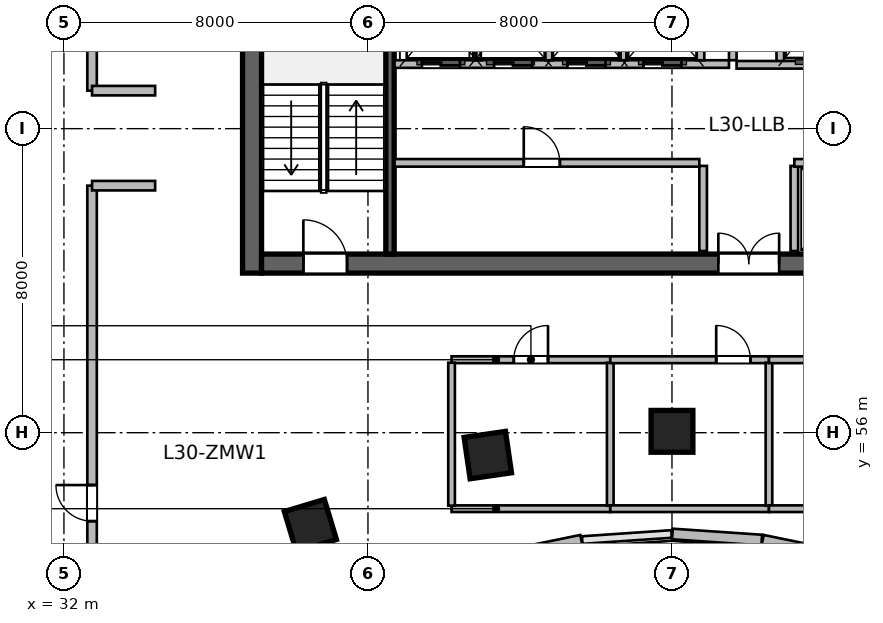
"""IFC4 building model, lengths in metres.
Left out: names, types, materials, properties, quantities, classifications, styles, units other than length and angle.
Written with IfcOpenShell. Run it as: python <this file> out.ifc"""

import sys

from ifc_helpers import new_model, si_unit, direction, frame, frame_2d, origin, origin_2d, place, context, subcontext, project, spatial, rectangle, extrude, source, transform, mapped, element, fill, save


model = new_model("IFC4")
c1 = context("Model", 3, precision=1e-05, world=origin(), true_north=direction((0.0, 1.0)))
c2 = subcontext(c1, "Body", "Model", "MODEL_VIEW")
j1 = project(units=[si_unit("LENGTHUNIT", "METRE"), si_unit("PLANEANGLEUNIT", "RADIAN")], contexts=[c1])
p1 = place(None, origin())
s1 = spatial("IfcSite", under=j1, at=p1, CompositionType="ELEMENT")
p2 = place(p1, origin())
s2 = spatial("IfcBuilding", under=s1, at=p2, CompositionType="ELEMENT")
p3 = place(p2, frame((0.0, 0.0, 127.2)))
s3 = spatial("IfcBuildingStorey", under=s2, at=p3, CompositionType="ELEMENT", Elevation=127.2)
m1 = source(origin(), c2, "Body", "SweptSolid", [
    extrude(rectangle(XDim=12.0, YDim=0.5, at=frame_2d((6.0, 0.0))), origin(), (0.0, 0.0, 1.0), 3.9),
])
p4 = place(p3, frame((36.95, 60.2, 0.0), z_axis=(0.0, 0.0, 1.0), x_axis=(0.0, 1.0, 0.0)))
e1 = element("IfcWall", 1, at=p4, inside=s3, PredefinedType="SHEAR", context=c2, shape_type="MappedRepresentation", body=[
    mapped(m1, transform((0.0, 0.0, 0.0), scale=1.0)),
])
m2 = source(origin(), c2, "Body", "SweptSolid", [
    extrude(rectangle(XDim=21.6, YDim=0.5, at=frame_2d((10.8, 0.0))), origin(), (0.0, 0.0, 1.0), 3.9),
])
p5 = place(p3, frame((37.2, 60.45, 0.0), z_axis=(0.0, 0.0, 1.0), x_axis=(1.0, 0.0, 0.0)))
e2 = element("IfcWall", 2, at=p5, inside=s3, PredefinedType="SHEAR", context=c2, shape_type="MappedRepresentation", body=[
    mapped(m2, transform((0.0, 0.0, 0.0), scale=1.0)),
])
p6 = place(p5, frame((1.1, 0.0, 0.0)))
e3 = element("IfcOpeningElement", 3, at=p6, cuts=e2, PredefinedType="OPENING", context=c2, shape_type="SweptSolid", body=[
    extrude(rectangle(XDim=1.15, YDim=2.15, at=frame_2d((0.575, 1.075))), frame((0.0, 0.26, 0.0), z_axis=(0.0, -1.0, 0.0), x_axis=(1.0, 0.0, 0.0)), (0.0, 0.0, 1.0), 0.52),
])
p7 = place(p5, frame((19.5, 0.0, 0.0)))
e4 = element("IfcOpeningElement", 4, at=p7, cuts=e2, PredefinedType="OPENING", context=c2, shape_type="SweptSolid", body=[
    extrude(rectangle(XDim=0.9, YDim=2.1, at=frame_2d((0.45, 1.05))), frame((0.0, 0.26, 0.0), z_axis=(0.0, -1.0, 0.0), x_axis=(1.0, 0.0, 0.0)), (0.0, 0.0, 1.0), 0.52),
])
p8 = place(p5, frame((12.02, 0.0, 0.0)))
e5 = element("IfcOpeningElement", 5, at=p8, cuts=e2, PredefinedType="OPENING", context=c2, shape_type="SweptSolid", body=[
    extrude(rectangle(XDim=1.6, YDim=2.15, at=frame_2d((0.8, 1.075))), frame((0.0, 0.26, 0.0), z_axis=(0.0, -1.0, 0.0), x_axis=(1.0, 0.0, 0.0)), (0.0, 0.0, 1.0), 0.52),
])
m3 = source(origin(), c2, "Body", "SweptSolid", [
    extrude(rectangle(XDim=11.0, YDim=0.22, at=frame_2d((5.5, 0.0))), origin(), (0.0, 0.0, 1.0), 3.9),
])
p9 = place(p3, frame((40.58, 60.7, 0.0), z_axis=(0.0, 0.0, 1.0), x_axis=(0.0, 1.0, 0.0)))
e6 = element("IfcWall", 6, at=p9, inside=s3, PredefinedType="SHEAR", context=c2, shape_type="MappedRepresentation", body=[
    mapped(m3, transform((0.0, 0.0, 0.0), scale=1.0)),
])
m4 = source(origin(), c2, "Body", "SweptSolid", [
    extrude(rectangle(XDim=1.1, YDim=1.1, at=origin_2d()), origin(), (0.0, 0.0, 1.0), 3.9),
])
for number, where, z_axis, x_axis in (
    (7, (38.485, 53.558, 0.0), (0.0, 0.0, 1.0), (-0.289, 0.957, 0.0)),
    (8, (43.154, 55.411, 0.0), (0.0, 0.0, 1.0), (-0.143, 0.99, 0.0)),
    (9, (48.0, 56.036, 0.0), (0.0, 0.0, 1.0), (0.0, 1.0, 0.0)),
):
    element("IfcColumn", number, at=place(p3, frame(where, z_axis=z_axis, x_axis=x_axis)), inside=s3, PredefinedType="COLUMN", context=c2, shape_type="MappedRepresentation", body=[
        mapped(m4, transform((0.0, 0.0, 0.0), scale=1.0)),
    ])
m5 = source(origin(), c2, "Body", "SweptSolid", [
    extrude(rectangle(XDim=2.374, YDim=0.28, at=frame_2d((1.187, 0.0))), origin(), (0.0, 0.0, 1.0), 3.65),
])
p10 = place(p3, frame((52.711, 52.695, 0.0), z_axis=(0.0, 0.0, 1.0), x_axis=(-0.979619827472, 0.200860632341, 0.0)))
e10 = element("IfcWall", 10, at=p10, inside=s3, PredefinedType="SOLIDWALL", context=c2, shape_type="MappedRepresentation", body=[
    mapped(m5, transform((0.0, 0.0, 0.0), scale=1.0)),
])
m6 = source(origin(), c2, "Body", "SweptSolid", [
    extrude(rectangle(XDim=2.355, YDim=0.28, at=frame_2d((1.177, 0.0))), origin(), (0.0, 0.0, 1.0), 3.65),
])
p11 = place(p3, frame((50.362, 53.175, 0.0), z_axis=(0.0, 0.0, 1.0), x_axis=(-0.997699017577, 0.067798748701, 0.0)))
e11 = element("IfcWall", 11, at=p11, inside=s3, PredefinedType="SOLIDWALL", context=c2, shape_type="MappedRepresentation", body=[
    mapped(m6, transform((0.0, 0.0, 0.0), scale=1.0)),
])
p12 = place(p3, frame((45.614, 53.172, 0.0), z_axis=(0.0, 0.0, 1.0), x_axis=(-0.979619827472, -0.200860632341, 0.0)))
e12 = element("IfcWall", 12, at=p12, inside=s3, PredefinedType="SOLIDWALL", context=c2, shape_type="MappedRepresentation", body=[
    mapped(m5, transform((0.0, 0.0, 0.0), scale=1.0)),
])
m7 = source(origin(), c2, "Body", "SweptSolid", [
    extrude(rectangle(XDim=2.24, YDim=0.2, at=frame_2d((1.12, 0.0))), origin(), (0.0, 0.0, 1.0), 3.65),
])
for number, where, z_axis, x_axis in (
    (13, (48.82, 60.78, 0.0), (0.0, 0.0, 1.0), (0.0, 1.0, 0.0)),
    (14, (51.22, 60.78, 0.0), (0.0, 0.0, 1.0), (0.0, 1.0, 0.0)),
):
    element("IfcWall", number, at=place(p3, frame(where, z_axis=z_axis, x_axis=x_axis)), inside=s3, PredefinedType="SOLIDWALL", context=c2, shape_type="MappedRepresentation", body=[
        mapped(m7, transform((0.0, 0.0, 0.0), scale=1.0)),
    ])
m8 = source(origin(), c2, "Body", "SweptSolid", [
    extrude(rectangle(XDim=5.8, YDim=0.2, at=frame_2d((2.9, 0.0))), origin(), (0.0, 0.0, 1.0), 3.65),
])
p13 = place(p3, frame((49.6, 65.8, 0.0), z_axis=(0.0, 0.0, 1.0), x_axis=(0.0, 1.0, 0.0)))
e15 = element("IfcWall", 15, at=p13, inside=s3, PredefinedType="SOLIDWALL", context=c2, shape_type="MappedRepresentation", body=[
    mapped(m8, transform((0.0, 0.0, 0.0), scale=1.0)),
])
m9 = source(origin(), c2, "Body", "SweptSolid", [
    extrude(rectangle(XDim=2.58, YDim=0.2, at=frame_2d((1.29, 0.0))), origin(), (0.0, 0.0, 1.0), 3.65),
])
p14 = place(p3, frame((50.85, 65.68, 0.0), z_axis=(0.0, 0.0, 1.0), x_axis=(0.0, 1.0, 0.0)))
e16 = element("IfcWall", 16, at=p14, inside=s3, PredefinedType="SOLIDWALL", context=c2, shape_type="MappedRepresentation", body=[
    mapped(m9, transform((0.0, 0.0, 0.0), scale=1.0)),
])
m10 = source(origin(), c2, "Body", "SweptSolid", [
    extrude(rectangle(XDim=5.62, YDim=0.2, at=frame_2d((2.81, 0.0))), origin(), (0.0, 0.0, 1.0), 3.65),
])
p15 = place(p3, frame((49.7, 65.68, 0.0), z_axis=(0.0, 0.0, 1.0), x_axis=(1.0, 0.0, 0.0)))
e17 = element("IfcWall", 17, at=p15, inside=s3, PredefinedType="SOLIDWALL", context=c2, shape_type="MappedRepresentation", body=[
    mapped(m10, transform((0.0, 0.0, 0.0), scale=1.0)),
])
m11 = source(origin(), c2, "Body", "SweptSolid", [
    extrude(rectangle(XDim=8.02, YDim=0.2, at=frame_2d((4.01, 0.0))), origin(), (0.0, 0.0, 1.0), 3.65),
])
p16 = place(p3, frame((40.7, 63.1, 0.0), z_axis=(0.0, 0.0, 1.0), x_axis=(1.0, 0.0, 0.0)))
e18 = element("IfcWall", 18, at=p16, inside=s3, PredefinedType="SOLIDWALL", context=c2, shape_type="MappedRepresentation", body=[
    mapped(m11, transform((0.0, 0.0, 0.0), scale=1.0)),
])
p17 = place(p16, frame((3.4, 0.0, 0.0)))
e19 = element("IfcOpeningElement", 19, at=p17, cuts=e18, PredefinedType="OPENING", context=c2, shape_type="SweptSolid", body=[
    extrude(rectangle(XDim=0.95, YDim=2.15, at=frame_2d((0.475, 1.075))), frame((0.0, 0.11, 0.0), z_axis=(0.0, -1.0, 0.0), x_axis=(1.0, 0.0, 0.0)), (0.0, 0.0, 1.0), 0.22),
])
m12 = source(origin(), c2, "Body", "SweptSolid", [
    extrude(rectangle(XDim=4.1, YDim=0.2, at=frame_2d((2.05, 0.0))), origin(), (0.0, 0.0, 1.0), 3.65),
])
p18 = place(p3, frame((51.22, 63.1, 0.0), z_axis=(0.0, 0.0, 1.0), x_axis=(1.0, 0.0, 0.0)))
e20 = element("IfcWall", 20, at=p18, inside=s3, PredefinedType="SOLIDWALL", context=c2, shape_type="MappedRepresentation", body=[
    mapped(m12, transform((0.0, 0.0, 0.0), scale=1.0)),
])
m13 = source(origin(), c2, "Body", "SweptSolid", [
    extrude(rectangle(XDim=8.8, YDim=0.2, at=frame_2d((4.4, 0.0))), origin(), (0.0, 0.0, 1.0), 3.65),
])
p19 = place(p3, frame((40.7, 65.7, 0.0), z_axis=(0.0, 0.0, 1.0), x_axis=(1.0, 0.0, 0.0)))
e21 = element("IfcWall", 21, at=p19, inside=s3, PredefinedType="SOLIDWALL", context=c2, shape_type="MappedRepresentation", body=[
    mapped(m13, transform((0.0, 0.0, 0.0), scale=1.0)),
])
p20 = place(p19, frame((0.72, 0.0, 0.0)))
e22 = element("IfcOpeningElement", 22, at=p20, cuts=e21, PredefinedType="OPENING", context=c2, shape_type="SweptSolid", body=[
    extrude(rectangle(XDim=1.0, YDim=2.15, at=frame_2d((0.5, 1.075))), frame((0.0, 0.11, 0.0), z_axis=(0.0, -1.0, 0.0), x_axis=(1.0, 0.0, 0.0)), (0.0, 0.0, 1.0), 0.22),
])
p21 = place(p19, frame((2.62, 0.0, 0.0)))
e23 = element("IfcOpeningElement", 23, at=p21, cuts=e21, PredefinedType="OPENING", context=c2, shape_type="SweptSolid", body=[
    extrude(rectangle(XDim=1.0, YDim=2.15, at=frame_2d((0.5, 1.075))), frame((0.0, 0.11, 0.0), z_axis=(0.0, -1.0, 0.0), x_axis=(1.0, 0.0, 0.0)), (0.0, 0.0, 1.0), 0.22),
])
p22 = place(p19, frame((4.55, 0.0, 0.0)))
e24 = element("IfcOpeningElement", 24, at=p22, cuts=e21, PredefinedType="OPENING", context=c2, shape_type="SweptSolid", body=[
    extrude(rectangle(XDim=1.0, YDim=2.15, at=frame_2d((0.5, 1.075))), frame((0.0, 0.11, 0.0), z_axis=(0.0, -1.0, 0.0), x_axis=(1.0, 0.0, 0.0)), (0.0, 0.0, 1.0), 0.22),
])
p23 = place(p19, frame((6.55, 0.0, 0.0)))
e25 = element("IfcOpeningElement", 25, at=p23, cuts=e21, PredefinedType="OPENING", context=c2, shape_type="SweptSolid", body=[
    extrude(rectangle(XDim=1.0, YDim=2.15, at=frame_2d((0.5, 1.075))), frame((0.0, 0.11, 0.0), z_axis=(0.0, -1.0, 0.0), x_axis=(1.0, 0.0, 0.0)), (0.0, 0.0, 1.0), 0.22),
])
m14 = source(origin(), c2, "Body", "SweptSolid", [
    extrude(rectangle(XDim=2.4, YDim=0.2, at=frame_2d((1.2, 0.0))), origin(), (0.0, 0.0, 1.0), 3.65),
])
for number, where, z_axis, x_axis in (
    (26, (48.75, 65.8, 0.0), (0.0, 0.0, 1.0), (0.0, 1.0, 0.0)),
    (27, (42.87, 65.8, 0.0), (0.0, 0.0, 1.0), (0.0, 1.0, 0.0)),
    (28, (44.77, 65.8, 0.0), (0.0, 0.0, 1.0), (0.0, 1.0, 0.0)),
    (29, (46.7, 65.8, 0.0), (0.0, 0.0, 1.0), (0.0, 1.0, 0.0)),
):
    element("IfcWall", number, at=place(p3, frame(where, z_axis=z_axis, x_axis=x_axis)), inside=s3, PredefinedType="SOLIDWALL", context=c2, shape_type="MappedRepresentation", body=[
        mapped(m14, transform((0.0, 0.0, 0.0), scale=1.0)),
    ])
m15 = source(origin(), c2, "Body", "SweptSolid", [
    extrude(rectangle(XDim=4.176, YDim=0.175, at=frame_2d((2.088, 0.0))), origin(), (0.0, 0.0, 1.0), 3.65),
])
p24 = place(p3, frame((42.2, 54.0, 0.0), z_axis=(0.0, 0.0, 1.0), x_axis=(1.0, 0.0, 0.0)))
e30 = element("IfcWall", 30, at=p24, inside=s3, PredefinedType="PARTITIONING", context=c2, shape_type="MappedRepresentation", body=[
    mapped(m15, transform((0.0, 0.0, 0.0), scale=1.0)),
])
m16 = source(origin(), c2, "Body", "SweptSolid", [
    extrude(rectangle(XDim=4.176, YDim=0.18, at=frame_2d((2.088, 0.0))), origin(), (0.0, 0.0, 1.0), 3.65),
])
p25 = place(p3, frame((42.2, 57.92, 0.0), z_axis=(0.0, 0.0, 1.0), x_axis=(1.0, 0.0, 0.0)))
e31 = element("IfcWall", 31, at=p25, inside=s3, PredefinedType="PLUMBINGWALL", context=c2, shape_type="MappedRepresentation", body=[
    mapped(m16, transform((0.0, 0.0, 0.0), scale=1.0)),
])
p26 = place(p25, frame((1.638, 0.0, 0.0)))
e32 = element("IfcOpeningElement", 32, at=p26, cuts=e31, PredefinedType="OPENING", context=c2, shape_type="SweptSolid", body=[
    extrude(rectangle(XDim=0.9, YDim=2.08, at=frame_2d((0.45, 1.04))), frame((0.0, 0.1, 0.0), z_axis=(0.0, -1.0, 0.0), x_axis=(1.0, 0.0, 0.0)), (0.0, 0.0, 1.0), 0.2),
])
m17 = source(origin(), c2, "Body", "SweptSolid", [
    extrude(rectangle(XDim=3.763, YDim=0.175, at=frame_2d((1.881, 0.0))), origin(), (0.0, 0.0, 1.0), 3.65),
])
for number, where, z_axis, x_axis in (
    (33, (42.2, 54.079, 0.0), (0.0, 0.0, 1.0), (0.0, 1.0, 0.0)),
    (34, (46.376, 54.079, 0.0), (0.0, 0.0, 1.0), (0.0, 1.0, 0.0)),
):
    element("IfcWall", number, at=place(p3, frame(where, z_axis=z_axis, x_axis=x_axis)), inside=s3, PredefinedType="PARTITIONING", context=c2, shape_type="MappedRepresentation", body=[
        mapped(m17, transform((0.0, 0.0, 0.0), scale=1.0)),
    ])
p27 = place(p3, frame((46.376, 54.0, 0.0), z_axis=(0.0, 0.0, 1.0), x_axis=(1.0, 0.0, 0.0)))
e35 = element("IfcWall", 35, at=p27, inside=s3, PredefinedType="PARTITIONING", context=c2, shape_type="MappedRepresentation", body=[
    mapped(m15, transform((0.0, 0.0, 0.0), scale=1.0)),
])
p28 = place(p3, frame((46.376, 57.92, 0.0), z_axis=(0.0, 0.0, 1.0), x_axis=(1.0, 0.0, 0.0)))
e36 = element("IfcWall", 36, at=p28, inside=s3, PredefinedType="PLUMBINGWALL", context=c2, shape_type="MappedRepresentation", body=[
    mapped(m16, transform((0.0, 0.0, 0.0), scale=1.0)),
])
p29 = place(p28, frame((2.788, 0.0, 0.0)))
e37 = element("IfcOpeningElement", 37, at=p29, cuts=e36, PredefinedType="OPENING", context=c2, shape_type="SweptSolid", body=[
    extrude(rectangle(XDim=0.9, YDim=2.08, at=frame_2d((0.45, 1.04))), frame((0.0, 0.1, 0.0), z_axis=(0.0, -1.0, 0.0), x_axis=(1.0, 0.0, 0.0)), (0.0, 0.0, 1.0), 0.2),
])
p30 = place(p3, frame((50.552, 54.079, 0.0), z_axis=(0.0, 0.0, 1.0), x_axis=(0.0, 1.0, 0.0)))
e38 = element("IfcWall", 38, at=p30, inside=s3, PredefinedType="PARTITIONING", context=c2, shape_type="MappedRepresentation", body=[
    mapped(m17, transform((0.0, 0.0, 0.0), scale=1.0)),
])
m18 = source(origin(), c2, "Body", "SweptSolid", [
    extrude(rectangle(XDim=3.248, YDim=0.175, at=frame_2d((1.624, 0.0))), origin(), (0.0, 0.0, 1.0), 3.65),
])
p31 = place(p3, frame((50.552, 54.0, 0.0), z_axis=(0.0, 0.0, 1.0), x_axis=(1.0, 0.0, 0.0)))
e39 = element("IfcWall", 39, at=p31, inside=s3, PredefinedType="PARTITIONING", context=c2, shape_type="MappedRepresentation", body=[
    mapped(m18, transform((0.0, 0.0, 0.0), scale=1.0)),
])
m19 = source(origin(), c2, "Body", "SweptSolid", [
    extrude(rectangle(XDim=3.248, YDim=0.18, at=frame_2d((1.624, 0.0))), origin(), (0.0, 0.0, 1.0), 3.65),
])
p32 = place(p3, frame((50.552, 57.92, 0.0), z_axis=(0.0, 0.0, 1.0), x_axis=(1.0, 0.0, 0.0)))
e40 = element("IfcWall", 40, at=p32, inside=s3, PredefinedType="PLUMBINGWALL", context=c2, shape_type="MappedRepresentation", body=[
    mapped(m19, transform((0.0, 0.0, 0.0), scale=1.0)),
])
p33 = place(p32, frame((1.149, 0.0, 0.0)))
e41 = element("IfcOpeningElement", 41, at=p33, cuts=e40, PredefinedType="OPENING", context=c2, shape_type="SweptSolid", body=[
    extrude(rectangle(XDim=0.95, YDim=2.12, at=frame_2d((0.475, 1.06))), frame((0.0, 0.1, 0.0), z_axis=(0.0, -1.0, 0.0), x_axis=(1.0, 0.0, 0.0)), (0.0, 0.0, 1.0), 0.2),
])
m20 = source(origin(), c2, "Body", "SweptSolid", [
    extrude(rectangle(XDim=16.706, YDim=0.25, at=frame_2d((8.353, 0.0))), origin(), (0.0, 0.0, 1.0), 2.942),
])
p34 = place(p3, frame((32.74, 45.794, 0.0), z_axis=(0.0, 0.0, 1.0), x_axis=(0.0, 1.0, 0.0)))
e42 = element("IfcWall", 42, at=p34, inside=s3, PredefinedType="PARTITIONING", context=c2, shape_type="MappedRepresentation", body=[
    mapped(m20, transform((0.0, 0.0, 0.0), scale=1.0)),
])
p35 = place(p34, frame((7.878, 0.0, 0.0)))
e43 = element("IfcOpeningElement", 43, at=p35, cuts=e42, PredefinedType="OPENING", context=c2, shape_type="SweptSolid", body=[
    extrude(rectangle(XDim=0.95, YDim=2.1, at=frame_2d((0.475, 1.05))), frame((0.0, 0.135, 0.0), z_axis=(0.0, -1.0, 0.0), x_axis=(1.0, 0.0, 0.0)), (0.0, 0.0, 1.0), 0.27),
])
m21 = source(origin(), c2, "Body", "SweptSolid", [
    extrude(rectangle(XDim=1.66, YDim=0.25, at=frame_2d((0.83, 0.0))), origin(), (0.0, 0.0, 1.0), 3.65),
])
p36 = place(p3, frame((32.74, 62.5, 0.0), z_axis=(0.0, 0.0, 1.0), x_axis=(1.0, 0.0, 0.0)))
e44 = element("IfcWall", 44, at=p36, inside=s3, PredefinedType="PARTITIONING", context=c2, shape_type="MappedRepresentation", body=[
    mapped(m21, transform((0.0, 0.0, 0.0), scale=1.0)),
])
m22 = source(origin(), c2, "Body", "SweptSolid", [
    extrude(rectangle(XDim=10.224, YDim=0.25, at=frame_2d((5.112, 0.0))), origin(), (0.0, 0.0, 1.0), 3.65),
])
p37 = place(p3, frame((32.74, 65.0, 0.0), z_axis=(0.0, 0.0, 1.0), x_axis=(0.0, 1.0, 0.0)))
e45 = element("IfcWall", 45, at=p37, inside=s3, PredefinedType="PARTITIONING", context=c2, shape_type="MappedRepresentation", body=[
    mapped(m22, transform((0.0, 0.0, 0.0), scale=1.0)),
])
p38 = place(p37, frame((3.65, 0.0, 0.0)))
e46 = element("IfcOpeningElement", 46, at=p38, cuts=e45, PredefinedType="OPENING", context=c2, shape_type="SweptSolid", body=[
    extrude(rectangle(XDim=0.95, YDim=2.1, at=frame_2d((0.475, 1.05))), frame((0.0, 0.135, 0.0), z_axis=(0.0, -1.0, 0.0), x_axis=(1.0, 0.0, 0.0)), (0.0, 0.0, 1.0), 0.27),
])
p39 = place(p3, frame((32.74, 65.0, 0.0), z_axis=(0.0, 0.0, 1.0), x_axis=(1.0, 0.0, 0.0)))
e47 = element("IfcWall", 47, at=p39, inside=s3, PredefinedType="PARTITIONING", context=c2, shape_type="MappedRepresentation", body=[
    mapped(m21, transform((0.0, 0.0, 0.0), scale=1.0)),
])
m23 = source(origin(), c2, "Body", "SweptSolid", [
    extrude(rectangle(XDim=1.15, YDim=2.15, at=frame_2d((0.575, 1.075))), frame((0.0, 0.025, 0.0), z_axis=(0.0, -1.0, 0.0), x_axis=(1.0, 0.0, 0.0)), (0.0, 0.0, 1.0), 0.05),
])
p40 = place(p6, origin())
e48 = element("IfcDoor", 48, at=p40, inside=s3, OperationType="SINGLE_SWING_LEFT", PredefinedType="DOOR", context=c2, shape_type="MappedRepresentation", body=[
    mapped(m23, transform((0.0, 0.0, 0.0), scale=1.0)),
])
fill(e3, e48)
m24 = source(origin(), c2, "Body", "SweptSolid", [
    extrude(rectangle(XDim=1.6, YDim=2.15, at=frame_2d((0.8, 1.075))), frame((0.0, 0.025, 0.0), z_axis=(0.0, -1.0, 0.0), x_axis=(1.0, 0.0, 0.0)), (0.0, 0.0, 1.0), 0.05),
])
p41 = place(p8, origin())
e49 = element("IfcDoor", 49, at=p41, inside=s3, OperationType="DOUBLE_DOOR_SINGLE_SWING", PredefinedType="DOOR", context=c2, shape_type="MappedRepresentation", body=[
    mapped(m24, transform((0.0, 0.0, 0.0), scale=1.0)),
])
fill(e5, e49)
m25 = source(origin(), c2, "Body", "SweptSolid", [
    extrude(rectangle(XDim=0.95, YDim=2.15, at=frame_2d((0.475, 1.075))), frame((0.0, 0.025, 0.0), z_axis=(0.0, -1.0, 0.0), x_axis=(1.0, 0.0, 0.0)), (0.0, 0.0, 1.0), 0.05),
])
p42 = place(p17, origin())
e50 = element("IfcDoor", 50, at=p42, inside=s3, OperationType="SINGLE_SWING_LEFT", PredefinedType="DOOR", context=c2, shape_type="MappedRepresentation", body=[
    mapped(m25, transform((0.0, 0.0, 0.0), scale=1.0)),
])
fill(e19, e50)
m26 = source(origin(), c2, "Body", "SweptSolid", [
    extrude(rectangle(XDim=1.0, YDim=2.15, at=frame_2d((0.5, 1.075))), frame((0.0, 0.025, 0.0), z_axis=(0.0, -1.0, 0.0), x_axis=(1.0, 0.0, 0.0)), (0.0, 0.0, 1.0), 0.05),
])
p43 = place(p20, origin())
e51 = element("IfcDoor", 51, at=p43, inside=s3, OperationType="DOUBLE_DOOR_SLIDING", PredefinedType="DOOR", context=c2, shape_type="MappedRepresentation", body=[
    mapped(m26, transform((0.0, 0.0, 0.0), scale=1.0)),
])
fill(e22, e51)
p44 = place(p21, origin())
e52 = element("IfcDoor", 52, at=p44, inside=s3, OperationType="DOUBLE_DOOR_SLIDING", PredefinedType="DOOR", context=c2, shape_type="MappedRepresentation", body=[
    mapped(m26, transform((0.0, 0.0, 0.0), scale=1.0)),
])
fill(e23, e52)
p45 = place(p22, origin())
e53 = element("IfcDoor", 53, at=p45, inside=s3, OperationType="DOUBLE_DOOR_SLIDING", PredefinedType="DOOR", context=c2, shape_type="MappedRepresentation", body=[
    mapped(m26, transform((0.0, 0.0, 0.0), scale=1.0)),
])
fill(e24, e53)
p46 = place(p23, origin())
e54 = element("IfcDoor", 54, at=p46, inside=s3, OperationType="DOUBLE_DOOR_SLIDING", PredefinedType="DOOR", context=c2, shape_type="MappedRepresentation", body=[
    mapped(m26, transform((0.0, 0.0, 0.0), scale=1.0)),
])
fill(e25, e54)
m27 = source(origin(), c2, "Body", "SweptSolid", [
    extrude(rectangle(XDim=0.9, YDim=2.08, at=frame_2d((0.45, 1.04))), frame((0.0, 0.025, 0.0), z_axis=(0.0, -1.0, 0.0), x_axis=(1.0, 0.0, 0.0)), (0.0, 0.0, 1.0), 0.05),
])
p47 = place(p26, origin())
e55 = element("IfcDoor", 55, at=p47, inside=s3, OperationType="SINGLE_SWING_RIGHT", PredefinedType="DOOR", context=c2, shape_type="MappedRepresentation", body=[
    mapped(m27, transform((0.0, 0.0, 0.0), scale=1.0)),
])
fill(e32, e55)
p48 = place(p29, origin())
e56 = element("IfcDoor", 56, at=p48, inside=s3, OperationType="SINGLE_SWING_LEFT", PredefinedType="DOOR", context=c2, shape_type="MappedRepresentation", body=[
    mapped(m27, transform((0.0, 0.0, 0.0), scale=1.0)),
])
fill(e37, e56)
m28 = source(origin(), c2, "Body", "SweptSolid", [
    extrude(rectangle(XDim=0.95, YDim=2.1, at=frame_2d((0.475, 1.05))), frame((0.0, 0.025, 0.0), z_axis=(0.0, -1.0, 0.0), x_axis=(1.0, 0.0, 0.0)), (0.0, 0.0, 1.0), 0.05),
])
p49 = place(p35, origin())
e57 = element("IfcDoor", 57, at=p49, inside=s3, OperationType="SINGLE_SWING_RIGHT", PredefinedType="DOOR", context=c2, shape_type="MappedRepresentation", body=[
    mapped(m28, transform((0.0, 0.0, 0.0), scale=1.0)),
])
fill(e43, e57)
save(model, sys.argv[1])
